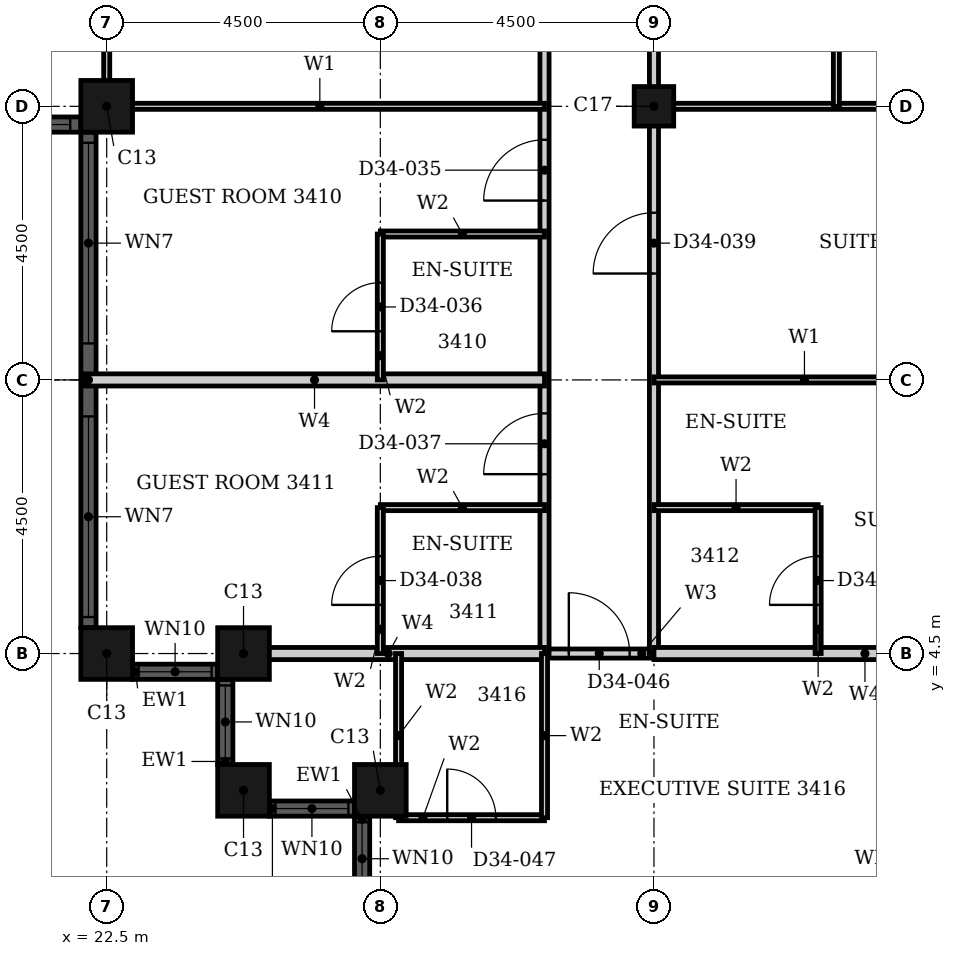
"""IFC4 building model, lengths in metres.
Left out: names, types, materials, properties, quantities, classifications, styles, units other than length and angle.
Written with IfcOpenShell. Run it as: python <this file> out.ifc"""

import sys

from ifc_helpers import new_model, si_unit, direction, frame, frame_2d, origin, origin_2d, place, context, subcontext, project, spatial, rectangle, hollow_rectangle, extrude, element, fill, save


model = new_model("IFC4")
c1 = context("Model", 3, precision=1e-05, world=origin(), true_north=direction((0.0, 1.0)))
c2 = subcontext(c1, "Body", "Model", "MODEL_VIEW")
j1 = project(units=[si_unit("LENGTHUNIT", "METRE"), si_unit("PLANEANGLEUNIT", "RADIAN")], contexts=[c1])
p1 = place(None, origin())
s1 = spatial("IfcSite", under=j1, at=p1, CompositionType="ELEMENT")
p2 = place(p1, origin())
s2 = spatial("IfcBuilding", under=s1, at=p2, CompositionType="ELEMENT")
p3 = place(p2, frame((0.0, 0.0, 136.8)))
s3 = spatial("IfcBuildingStorey", under=s2, at=p3, CompositionType="ELEMENT", Elevation=136.8)
for number, where, z_axis, x_axis in (
    (1, (22.5, 4.5, 0.0), (0.0, 0.0, 1.0), (1.0, 0.0, 0.0)),
    (2, (24.75, 4.5, 0.0), (0.0, 0.0, 1.0), (1.0, 0.0, 0.0)),
    (3, (24.75, 2.25, 0.0), (0.0, 0.0, 1.0), (1.0, 0.0, 0.0)),
    (4, (27.0, 2.25, 0.0), (0.0, 0.0, 1.0), (1.0, 0.0, 0.0)),
    (5, (22.5, 13.5, 0.0), (0.0, 0.0, 1.0), (1.0, 0.0, 0.0)),
):
    element("IfcColumn", number, at=place(p3, frame(where, z_axis=z_axis, x_axis=x_axis)), inside=s3, PredefinedType="COLUMN", context=c2, shape_type="SweptSolid", body=[
        extrude(hollow_rectangle(XDim=0.85, YDim=0.85, WallThickness=0.026, at=origin_2d()), origin(), (0.0, 0.0, 1.0), 3.6),
    ])
p4 = place(p3, frame((31.5, 13.5, 0.0), z_axis=(0.0, 0.0, 1.0), x_axis=(1.0, 0.0, 0.0)))
e6 = element("IfcColumn", 6, at=p4, inside=s3, PredefinedType="COLUMN", context=c2, shape_type="SweptSolid", body=[
    extrude(hollow_rectangle(XDim=0.65, YDim=0.65, WallThickness=0.021, at=origin_2d()), origin(), (0.0, 0.0, 1.0), 3.6),
])
p5 = place(p3, frame((22.925, 4.2, 0.0), z_axis=(0.0, 0.0, 1.0), x_axis=(1.0, 0.0, 0.0)))
e7 = element("IfcWall", 7, at=p5, inside=s3, PredefinedType="SOLIDWALL", context=c2, shape_type="SweptSolid", body=[
    extrude(rectangle(XDim=1.4, YDim=0.25, at=frame_2d((0.7, 0.0))), origin(), (0.0, 0.0, 1.0), 3.6),
])
p6 = place(p5, frame((0.1, 0.0, 0.9)))
e8 = element("IfcOpeningElement", 8, at=p6, cuts=e7, PredefinedType="OPENING", context=c2, shape_type="SweptSolid", body=[
    extrude(rectangle(XDim=1.2, YDim=1.85, at=frame_2d((0.6, 0.925))), frame((0.0, 0.135, 0.0), z_axis=(0.0, -1.0, 0.0), x_axis=(1.0, 0.0, 0.0)), (0.0, 0.0, 1.0), 0.27),
])
p7 = place(p3, frame((24.45, 4.075, 0.0), z_axis=(0.0, 0.0, 1.0), x_axis=(0.0, -1.0, 0.0)))
e9 = element("IfcWall", 9, at=p7, inside=s3, PredefinedType="SOLIDWALL", context=c2, shape_type="SweptSolid", body=[
    extrude(rectangle(XDim=1.4, YDim=0.25, at=frame_2d((0.7, 0.0))), origin(), (0.0, 0.0, 1.0), 3.6),
])
p8 = place(p7, frame((0.1, 0.0, 0.9)))
e10 = element("IfcOpeningElement", 10, at=p8, cuts=e9, PredefinedType="OPENING", context=c2, shape_type="SweptSolid", body=[
    extrude(rectangle(XDim=1.2, YDim=1.85, at=frame_2d((0.6, 0.925))), frame((0.0, 0.135, 0.0), z_axis=(0.0, -1.0, 0.0), x_axis=(1.0, 0.0, 0.0)), (0.0, 0.0, 1.0), 0.27),
])
p9 = place(p3, frame((25.175, 1.95, 0.0), z_axis=(0.0, 0.0, 1.0), x_axis=(1.0, 0.0, 0.0)))
e11 = element("IfcWall", 11, at=p9, inside=s3, PredefinedType="SOLIDWALL", context=c2, shape_type="SweptSolid", body=[
    extrude(rectangle(XDim=1.4, YDim=0.25, at=frame_2d((0.7, 0.0))), origin(), (0.0, 0.0, 1.0), 3.6),
])
p10 = place(p9, frame((0.1, 0.0, 0.9)))
e12 = element("IfcOpeningElement", 12, at=p10, cuts=e11, PredefinedType="OPENING", context=c2, shape_type="SweptSolid", body=[
    extrude(rectangle(XDim=1.2, YDim=1.85, at=frame_2d((0.6, 0.925))), frame((0.0, 0.135, 0.0), z_axis=(0.0, -1.0, 0.0), x_axis=(1.0, 0.0, 0.0)), (0.0, 0.0, 1.0), 0.27),
])
p11 = place(p3, frame((26.7, 1.825, 0.0), z_axis=(0.0, 0.0, 1.0), x_axis=(0.0, -1.0, 0.0)))
e13 = element("IfcWall", 13, at=p11, inside=s3, PredefinedType="SOLIDWALL", context=c2, shape_type="SweptSolid", body=[
    extrude(rectangle(XDim=1.4, YDim=0.25, at=frame_2d((0.7, 0.0))), origin(), (0.0, 0.0, 1.0), 3.6),
])
p12 = place(p11, frame((0.1, 0.0, 0.9)))
e14 = element("IfcOpeningElement", 14, at=p12, cuts=e13, PredefinedType="OPENING", context=c2, shape_type="SweptSolid", body=[
    extrude(rectangle(XDim=1.2, YDim=1.85, at=frame_2d((0.6, 0.925))), frame((0.0, 0.135, 0.0), z_axis=(0.0, -1.0, 0.0), x_axis=(1.0, 0.0, 0.0)), (0.0, 0.0, 1.0), 0.27),
])
p13 = place(p3, frame((18.425, 13.2, 0.0), z_axis=(0.0, 0.0, 1.0), x_axis=(1.0, 0.0, 0.0)))
e15 = element("IfcWall", 15, at=p13, inside=s3, PredefinedType="SOLIDWALL", context=c2, shape_type="SweptSolid", body=[
    extrude(rectangle(XDim=3.65, YDim=0.25, at=frame_2d((1.825, 0.0))), origin(), (0.0, 0.0, 1.0), 3.6),
])
p14 = place(p13, frame((0.175, 0.0, 0.9)))
e16 = element("IfcOpeningElement", 16, at=p14, cuts=e15, PredefinedType="OPENING", context=c2, shape_type="SweptSolid", body=[
    extrude(rectangle(XDim=3.3, YDim=1.85, at=frame_2d((1.65, 0.925))), frame((0.0, 0.135, 0.0), z_axis=(0.0, -1.0, 0.0), x_axis=(1.0, 0.0, 0.0)), (0.0, 0.0, 1.0), 0.27),
])
p15 = place(p3, frame((22.2, 13.075, 0.0), z_axis=(0.0, 0.0, 1.0), x_axis=(0.0, -1.0, 0.0)))
e17 = element("IfcWall", 17, at=p15, inside=s3, PredefinedType="SOLIDWALL", context=c2, shape_type="SweptSolid", body=[
    extrude(rectangle(XDim=8.15, YDim=0.25, at=frame_2d((4.075, 0.0))), origin(), (0.0, 0.0, 1.0), 3.6),
])
p16 = place(p15, frame((0.175, 0.0, 0.9)))
e18 = element("IfcOpeningElement", 18, at=p16, cuts=e17, PredefinedType="OPENING", context=c2, shape_type="SweptSolid", body=[
    extrude(rectangle(XDim=3.3, YDim=1.85, at=frame_2d((1.65, 0.925))), frame((0.0, 0.135, 0.0), z_axis=(0.0, -1.0, 0.0), x_axis=(1.0, 0.0, 0.0)), (0.0, 0.0, 1.0), 0.27),
])
p17 = place(p15, frame((4.675, 0.0, 0.9)))
e19 = element("IfcOpeningElement", 19, at=p17, cuts=e17, PredefinedType="OPENING", context=c2, shape_type="SweptSolid", body=[
    extrude(rectangle(XDim=3.3, YDim=1.85, at=frame_2d((1.65, 0.925))), frame((0.0, 0.135, 0.0), z_axis=(0.0, -1.0, 0.0), x_axis=(1.0, 0.0, 0.0)), (0.0, 0.0, 1.0), 0.27),
])
p18 = place(p3, frame((29.7, 4.5, 0.0), z_axis=(0.0, 0.0, 1.0), x_axis=(1.0, 0.0, 0.0)))
e20 = element("IfcWall", 20, at=p18, inside=s3, PredefinedType="PARTITIONING", context=c2, shape_type="SweptSolid", body=[
    extrude(rectangle(XDim=1.8, YDim=0.15, at=frame_2d((0.9, 0.0))), origin(), (0.0, 0.0, 1.0), 3.2),
])
p19 = place(p18, frame((0.4, 0.0, 0.0)))
e21 = element("IfcOpeningElement", 21, at=p19, cuts=e20, PredefinedType="OPENING", context=c2, shape_type="SweptSolid", body=[
    extrude(rectangle(XDim=1.0, YDim=2.1, at=frame_2d((0.5, 1.05))), frame((0.0, 0.085, 0.0), z_axis=(0.0, -1.0, 0.0), x_axis=(1.0, 0.0, 0.0)), (0.0, 0.0, 1.0), 0.17),
])
p20 = place(p3, frame((29.7, 4.5, 0.0), z_axis=(0.0, 0.0, 1.0), x_axis=(0.0, 1.0, 0.0)))
e22 = element("IfcWall", 22, at=p20, inside=s3, PredefinedType="PARTITIONING", context=c2, shape_type="SweptSolid", body=[
    extrude(rectangle(XDim=16.2, YDim=0.15, at=frame_2d((8.1, 0.0))), origin(), (0.0, 0.0, 1.0), 3.2),
])
p21 = place(p20, frame((7.45, 0.0, 0.0)))
e23 = element("IfcOpeningElement", 23, at=p21, cuts=e22, PredefinedType="OPENING", context=c2, shape_type="SweptSolid", body=[
    extrude(rectangle(XDim=1.0, YDim=2.1, at=frame_2d((0.5, 1.05))), frame((0.0, 0.085, 0.0), z_axis=(0.0, -1.0, 0.0), x_axis=(1.0, 0.0, 0.0)), (0.0, 0.0, 1.0), 0.17),
])
p22 = place(p20, frame((2.95, 0.0, 0.0)))
e24 = element("IfcOpeningElement", 24, at=p22, cuts=e22, PredefinedType="OPENING", context=c2, shape_type="SweptSolid", body=[
    extrude(rectangle(XDim=1.0, YDim=2.1, at=frame_2d((0.5, 1.05))), frame((0.0, 0.085, 0.0), z_axis=(0.0, -1.0, 0.0), x_axis=(1.0, 0.0, 0.0)), (0.0, 0.0, 1.0), 0.17),
])
p23 = place(p3, frame((31.5, 4.5, 0.0), z_axis=(0.0, 0.0, 1.0), x_axis=(0.0, 1.0, 0.0)))
e25 = element("IfcWall", 25, at=p23, inside=s3, PredefinedType="PARTITIONING", context=c2, shape_type="SweptSolid", body=[
    extrude(rectangle(XDim=16.2, YDim=0.15, at=frame_2d((8.1, 0.0))), origin(), (0.0, 0.0, 1.0), 2.48),
])
p24 = place(p23, frame((6.25, 0.0, 0.0)))
e26 = element("IfcOpeningElement", 26, at=p24, cuts=e25, PredefinedType="OPENING", context=c2, shape_type="SweptSolid", body=[
    extrude(rectangle(XDim=1.0, YDim=2.1, at=frame_2d((0.5, 1.05))), frame((0.0, 0.085, 0.0), z_axis=(0.0, -1.0, 0.0), x_axis=(1.0, 0.0, 0.0)), (0.0, 0.0, 1.0), 0.17),
])
p25 = place(p3, frame((22.31, 13.5, 0.0), z_axis=(0.0, 0.0, 1.0), x_axis=(1.0, 0.0, 0.0)))
e27 = element("IfcWall", 27, at=p25, inside=s3, PredefinedType="PARTITIONING", context=c2, shape_type="SweptSolid", body=[
    extrude(rectangle(XDim=7.39, YDim=0.1, at=frame_2d((3.695, 0.0))), origin(), (0.0, 0.0, 1.0), 2.28),
])
p26 = place(p3, frame((31.5, 13.5, 0.0), z_axis=(0.0, 0.0, 1.0), x_axis=(1.0, 0.0, 0.0)))
e28 = element("IfcWall", 28, at=p26, inside=s3, PredefinedType="PARTITIONING", context=c2, shape_type="SweptSolid", body=[
    extrude(rectangle(XDim=9.19, YDim=0.1, at=frame_2d((4.595, 0.0))), origin(), (0.0, 0.0, 1.0), 2.28),
])
p27 = place(p3, frame((31.5, 9.0, 0.0), z_axis=(0.0, 0.0, 1.0), x_axis=(1.0, 0.0, 0.0)))
e29 = element("IfcWall", 29, at=p27, inside=s3, PredefinedType="PARTITIONING", context=c2, shape_type="SweptSolid", body=[
    extrude(rectangle(XDim=9.365, YDim=0.1, at=frame_2d((4.683, 0.0))), origin(), (0.0, 0.0, 1.0), 3.2),
])
p28 = place(p27, frame((4.95, 0.0, 0.0)))
e30 = element("IfcOpeningElement", 30, at=p28, cuts=e29, PredefinedType="OPENING", context=c2, shape_type="SweptSolid", body=[
    extrude(rectangle(XDim=0.9, YDim=2.1, at=frame_2d((0.45, 1.05))), frame((0.0, 0.06, 0.0), z_axis=(0.0, -1.0, 0.0), x_axis=(1.0, 0.0, 0.0)), (0.0, 0.0, 1.0), 0.12),
])
p29 = place(p3, frame((22.5, 13.31, 0.0), z_axis=(0.0, 0.0, 1.0), x_axis=(0.0, 1.0, 0.0)))
e31 = element("IfcWall", 31, at=p29, inside=s3, PredefinedType="PARTITIONING", context=c2, shape_type="SweptSolid", body=[
    extrude(rectangle(XDim=7.39, YDim=0.1, at=frame_2d((3.695, 0.0))), origin(), (0.0, 0.0, 1.0), 3.2),
])
p30 = place(p3, frame((34.5, 13.5, 0.0), z_axis=(0.0, 0.0, 1.0), x_axis=(0.0, 1.0, 0.0)))
e32 = element("IfcWall", 32, at=p30, inside=s3, PredefinedType="PARTITIONING", context=c2, shape_type="SweptSolid", body=[
    extrude(rectangle(XDim=7.2, YDim=0.1, at=frame_2d((3.6, 0.0))), origin(), (0.0, 0.0, 1.0), 3.2),
])
p31 = place(p3, frame((24.56, 4.5, 0.0), z_axis=(0.0, 0.0, 1.0), x_axis=(1.0, 0.0, 0.0)))
e33 = element("IfcWall", 33, at=p31, inside=s3, PredefinedType="PARTITIONING", context=c2, shape_type="SweptSolid", body=[
    extrude(rectangle(XDim=5.14, YDim=0.2, at=frame_2d((2.57, 0.0))), origin(), (0.0, 0.0, 1.0), 3.2),
])
p32 = place(p3, frame((31.5, 4.5, 0.0), z_axis=(0.0, 0.0, 1.0), x_axis=(1.0, 0.0, 0.0)))
e34 = element("IfcWall", 34, at=p32, inside=s3, PredefinedType="PARTITIONING", context=c2, shape_type="SweptSolid", body=[
    extrude(rectangle(XDim=6.94, YDim=0.2, at=frame_2d((3.47, 0.0))), origin(), (0.0, 0.0, 1.0), 3.2),
])
p33 = place(p3, frame((22.135, 9.0, 0.0), z_axis=(0.0, 0.0, 1.0), x_axis=(1.0, 0.0, 0.0)))
e35 = element("IfcWall", 35, at=p33, inside=s3, PredefinedType="PARTITIONING", context=c2, shape_type="SweptSolid", body=[
    extrude(rectangle(XDim=7.565, YDim=0.2, at=frame_2d((3.782, 0.0))), origin(), (0.0, 0.0, 1.0), 3.2),
])
p34 = place(p3, frame((27.3, 1.8, 0.0), z_axis=(0.0, 0.0, 1.0), x_axis=(1.0, 0.0, 0.0)))
e36 = element("IfcWall", 36, at=p34, inside=s3, PredefinedType="PARTITIONING", context=c2, shape_type="SweptSolid", body=[
    extrude(rectangle(XDim=2.4, YDim=0.1, at=frame_2d((1.2, 0.0))), origin(), (0.0, 0.0, 1.0), 3.2),
])
p35 = place(p34, frame((0.8, 0.0, 0.0)))
e37 = element("IfcOpeningElement", 37, at=p35, cuts=e36, PredefinedType="OPENING", context=c2, shape_type="SweptSolid", body=[
    extrude(rectangle(XDim=0.8, YDim=2.1, at=frame_2d((0.4, 1.05))), frame((0.0, 0.06, 0.0), z_axis=(0.0, -1.0, 0.0), x_axis=(1.0, 0.0, 0.0)), (0.0, 0.0, 1.0), 0.12),
])
for number, where, z_axis, x_axis in (
    (38, (27.0, 11.4, 0.0), (0.0, 0.0, 1.0), (1.0, 0.0, 0.0)),
    (39, (27.0, 6.9, 0.0), (0.0, 0.0, 1.0), (1.0, 0.0, 0.0)),
    (40, (31.5, 6.9, 0.0), (0.0, 0.0, 1.0), (1.0, 0.0, 0.0)),
):
    element("IfcWall", number, at=place(p3, frame(where, z_axis=z_axis, x_axis=x_axis)), inside=s3, PredefinedType="PARTITIONING", context=c2, shape_type="SweptSolid", body=[
        extrude(rectangle(XDim=2.7, YDim=0.1, at=frame_2d((1.35, 0.0))), origin(), (0.0, 0.0, 1.0), 3.2),
    ])
p36 = place(p3, frame((27.0, 9.0, 0.0), z_axis=(0.0, 0.0, 1.0), x_axis=(0.0, 1.0, 0.0)))
e41 = element("IfcWall", 41, at=p36, inside=s3, PredefinedType="PARTITIONING", context=c2, shape_type="SweptSolid", body=[
    extrude(rectangle(XDim=2.4, YDim=0.1, at=frame_2d((1.2, 0.0))), origin(), (0.0, 0.0, 1.0), 2.48),
])
p37 = place(p36, frame((0.8, 0.0, 0.0)))
e42 = element("IfcOpeningElement", 42, at=p37, cuts=e41, PredefinedType="OPENING", context=c2, shape_type="SweptSolid", body=[
    extrude(rectangle(XDim=0.8, YDim=2.1, at=frame_2d((0.4, 1.05))), frame((0.0, 0.06, 0.0), z_axis=(0.0, -1.0, 0.0), x_axis=(1.0, 0.0, 0.0)), (0.0, 0.0, 1.0), 0.12),
])
p38 = place(p3, frame((27.0, 4.5, 0.0), z_axis=(0.0, 0.0, 1.0), x_axis=(0.0, 1.0, 0.0)))
e43 = element("IfcWall", 43, at=p38, inside=s3, PredefinedType="PARTITIONING", context=c2, shape_type="SweptSolid", body=[
    extrude(rectangle(XDim=2.4, YDim=0.1, at=frame_2d((1.2, 0.0))), origin(), (0.0, 0.0, 1.0), 2.48),
])
p39 = place(p38, frame((0.8, 0.0, 0.0)))
e44 = element("IfcOpeningElement", 44, at=p39, cuts=e43, PredefinedType="OPENING", context=c2, shape_type="SweptSolid", body=[
    extrude(rectangle(XDim=0.8, YDim=2.1, at=frame_2d((0.4, 1.05))), frame((0.0, 0.06, 0.0), z_axis=(0.0, -1.0, 0.0), x_axis=(1.0, 0.0, 0.0)), (0.0, 0.0, 1.0), 0.12),
])
for number, where, z_axis, x_axis in (
    (45, (27.3, 1.8, 0.0), (0.0, 0.0, 1.0), (0.0, 1.0, 0.0)),
    (46, (29.7, 1.8, 0.0), (0.0, 0.0, 1.0), (0.0, 1.0, 0.0)),
):
    element("IfcWall", number, at=place(p3, frame(where, z_axis=z_axis, x_axis=x_axis)), inside=s3, PredefinedType="PARTITIONING", context=c2, shape_type="SweptSolid", body=[
        extrude(rectangle(XDim=2.7, YDim=0.1, at=frame_2d((1.35, 0.0))), origin(), (0.0, 0.0, 1.0), 3.2),
    ])
p40 = place(p3, frame((34.2, 4.5, 0.0), z_axis=(0.0, 0.0, 1.0), x_axis=(0.0, 1.0, 0.0)))
e47 = element("IfcWall", 47, at=p40, inside=s3, PredefinedType="PARTITIONING", context=c2, shape_type="SweptSolid", body=[
    extrude(rectangle(XDim=2.4, YDim=0.1, at=frame_2d((1.2, 0.0))), origin(), (0.0, 0.0, 1.0), 3.2),
])
p41 = place(p40, frame((0.8, 0.0, 0.0)))
e48 = element("IfcOpeningElement", 48, at=p41, cuts=e47, PredefinedType="OPENING", context=c2, shape_type="SweptSolid", body=[
    extrude(rectangle(XDim=0.8, YDim=2.1, at=frame_2d((0.4, 1.05))), frame((0.0, 0.06, 0.0), z_axis=(0.0, -1.0, 0.0), x_axis=(1.0, 0.0, 0.0)), (0.0, 0.0, 1.0), 0.12),
])
p42 = place(p6, origin())
e49 = element("IfcWindow", 49, at=p42, inside=s3, PartitioningType="SINGLE_PANEL", PredefinedType="WINDOW", context=c2, shape_type="SweptSolid", body=[
    extrude(rectangle(XDim=1.2, YDim=1.85, at=frame_2d((0.6, 0.925))), frame((0.0, 0.03, 0.0), z_axis=(0.0, -1.0, 0.0), x_axis=(1.0, 0.0, 0.0)), (0.0, 0.0, 1.0), 0.06),
])
fill(e8, e49)
p43 = place(p8, origin())
e50 = element("IfcWindow", 50, at=p43, inside=s3, PartitioningType="SINGLE_PANEL", PredefinedType="WINDOW", context=c2, shape_type="SweptSolid", body=[
    extrude(rectangle(XDim=1.2, YDim=1.85, at=frame_2d((0.6, 0.925))), frame((0.0, 0.03, 0.0), z_axis=(0.0, -1.0, 0.0), x_axis=(1.0, 0.0, 0.0)), (0.0, 0.0, 1.0), 0.06),
])
fill(e10, e50)
p44 = place(p10, origin())
e51 = element("IfcWindow", 51, at=p44, inside=s3, PartitioningType="SINGLE_PANEL", PredefinedType="WINDOW", context=c2, shape_type="SweptSolid", body=[
    extrude(rectangle(XDim=1.2, YDim=1.85, at=frame_2d((0.6, 0.925))), frame((0.0, 0.03, 0.0), z_axis=(0.0, -1.0, 0.0), x_axis=(1.0, 0.0, 0.0)), (0.0, 0.0, 1.0), 0.06),
])
fill(e12, e51)
p45 = place(p12, origin())
e52 = element("IfcWindow", 52, at=p45, inside=s3, PartitioningType="SINGLE_PANEL", PredefinedType="WINDOW", context=c2, shape_type="SweptSolid", body=[
    extrude(rectangle(XDim=1.2, YDim=1.85, at=frame_2d((0.6, 0.925))), frame((0.0, 0.03, 0.0), z_axis=(0.0, -1.0, 0.0), x_axis=(1.0, 0.0, 0.0)), (0.0, 0.0, 1.0), 0.06),
])
fill(e14, e52)
p46 = place(p14, origin())
e53 = element("IfcWindow", 53, at=p46, inside=s3, PartitioningType="SINGLE_PANEL", PredefinedType="WINDOW", context=c2, shape_type="SweptSolid", body=[
    extrude(rectangle(XDim=3.3, YDim=1.85, at=frame_2d((1.65, 0.925))), frame((0.0, 0.03, 0.0), z_axis=(0.0, -1.0, 0.0), x_axis=(1.0, 0.0, 0.0)), (0.0, 0.0, 1.0), 0.06),
])
fill(e16, e53)
p47 = place(p16, origin())
e54 = element("IfcWindow", 54, at=p47, inside=s3, PartitioningType="SINGLE_PANEL", PredefinedType="WINDOW", context=c2, shape_type="SweptSolid", body=[
    extrude(rectangle(XDim=3.3, YDim=1.85, at=frame_2d((1.65, 0.925))), frame((0.0, 0.03, 0.0), z_axis=(0.0, -1.0, 0.0), x_axis=(1.0, 0.0, 0.0)), (0.0, 0.0, 1.0), 0.06),
])
fill(e18, e54)
p48 = place(p17, origin())
e55 = element("IfcWindow", 55, at=p48, inside=s3, PartitioningType="SINGLE_PANEL", PredefinedType="WINDOW", context=c2, shape_type="SweptSolid", body=[
    extrude(rectangle(XDim=3.3, YDim=1.85, at=frame_2d((1.65, 0.925))), frame((0.0, 0.03, 0.0), z_axis=(0.0, -1.0, 0.0), x_axis=(1.0, 0.0, 0.0)), (0.0, 0.0, 1.0), 0.06),
])
fill(e19, e55)
p49 = place(p21, origin())
e56 = element("IfcDoor", 56, at=p49, inside=s3, OperationType="SINGLE_SWING_RIGHT", PredefinedType="DOOR", context=c2, shape_type="SweptSolid", body=[
    extrude(rectangle(XDim=1.0, YDim=2.1, at=frame_2d((0.5, 1.05))), frame((0.0, 0.025, 0.0), z_axis=(0.0, -1.0, 0.0), x_axis=(1.0, 0.0, 0.0)), (0.0, 0.0, 1.0), 0.05),
])
fill(e23, e56)
p50 = place(p37, origin())
e57 = element("IfcDoor", 57, at=p50, inside=s3, OperationType="SINGLE_SWING_RIGHT", PredefinedType="DOOR", context=c2, shape_type="SweptSolid", body=[
    extrude(rectangle(XDim=0.8, YDim=2.1, at=frame_2d((0.4, 1.05))), frame((0.0, 0.025, 0.0), z_axis=(0.0, -1.0, 0.0), x_axis=(1.0, 0.0, 0.0)), (0.0, 0.0, 1.0), 0.05),
])
fill(e42, e57)
p51 = place(p22, origin())
e58 = element("IfcDoor", 58, at=p51, inside=s3, OperationType="SINGLE_SWING_RIGHT", PredefinedType="DOOR", context=c2, shape_type="SweptSolid", body=[
    extrude(rectangle(XDim=1.0, YDim=2.1, at=frame_2d((0.5, 1.05))), frame((0.0, 0.025, 0.0), z_axis=(0.0, -1.0, 0.0), x_axis=(1.0, 0.0, 0.0)), (0.0, 0.0, 1.0), 0.05),
])
fill(e24, e58)
p52 = place(p39, origin())
e59 = element("IfcDoor", 59, at=p52, inside=s3, OperationType="SINGLE_SWING_LEFT", PredefinedType="DOOR", context=c2, shape_type="SweptSolid", body=[
    extrude(rectangle(XDim=0.8, YDim=2.1, at=frame_2d((0.4, 1.05))), frame((0.0, 0.025, 0.0), z_axis=(0.0, -1.0, 0.0), x_axis=(1.0, 0.0, 0.0)), (0.0, 0.0, 1.0), 0.05),
])
fill(e44, e59)
p53 = place(p24, origin())
e60 = element("IfcDoor", 60, at=p53, inside=s3, OperationType="SINGLE_SWING_RIGHT", PredefinedType="DOOR", context=c2, shape_type="SweptSolid", body=[
    extrude(rectangle(XDim=1.0, YDim=2.1, at=frame_2d((0.5, 1.05))), frame((0.0, 0.025, 0.0), z_axis=(0.0, -1.0, 0.0), x_axis=(1.0, 0.0, 0.0)), (0.0, 0.0, 1.0), 0.05),
])
fill(e26, e60)
p54 = place(p41, origin())
e61 = element("IfcDoor", 61, at=p54, inside=s3, OperationType="SINGLE_SWING_LEFT", PredefinedType="DOOR", context=c2, shape_type="SweptSolid", body=[
    extrude(rectangle(XDim=0.8, YDim=2.1, at=frame_2d((0.4, 1.05))), frame((0.0, 0.025, 0.0), z_axis=(0.0, -1.0, 0.0), x_axis=(1.0, 0.0, 0.0)), (0.0, 0.0, 1.0), 0.05),
])
fill(e48, e61)
p55 = place(p19, origin())
e62 = element("IfcDoor", 62, at=p55, inside=s3, OperationType="SINGLE_SWING_RIGHT", PredefinedType="DOOR", context=c2, shape_type="SweptSolid", body=[
    extrude(rectangle(XDim=1.0, YDim=2.1, at=frame_2d((0.5, 1.05))), frame((0.0, 0.025, 0.0), z_axis=(0.0, -1.0, 0.0), x_axis=(1.0, 0.0, 0.0)), (0.0, 0.0, 1.0), 0.05),
])
fill(e21, e62)
p56 = place(p35, origin())
e63 = element("IfcDoor", 63, at=p56, inside=s3, OperationType="SINGLE_SWING_LEFT", PredefinedType="DOOR", context=c2, shape_type="SweptSolid", body=[
    extrude(rectangle(XDim=0.8, YDim=2.1, at=frame_2d((0.4, 1.05))), frame((0.0, 0.025, 0.0), z_axis=(0.0, -1.0, 0.0), x_axis=(1.0, 0.0, 0.0)), (0.0, 0.0, 1.0), 0.05),
])
fill(e37, e63)
save(model, sys.argv[1])
